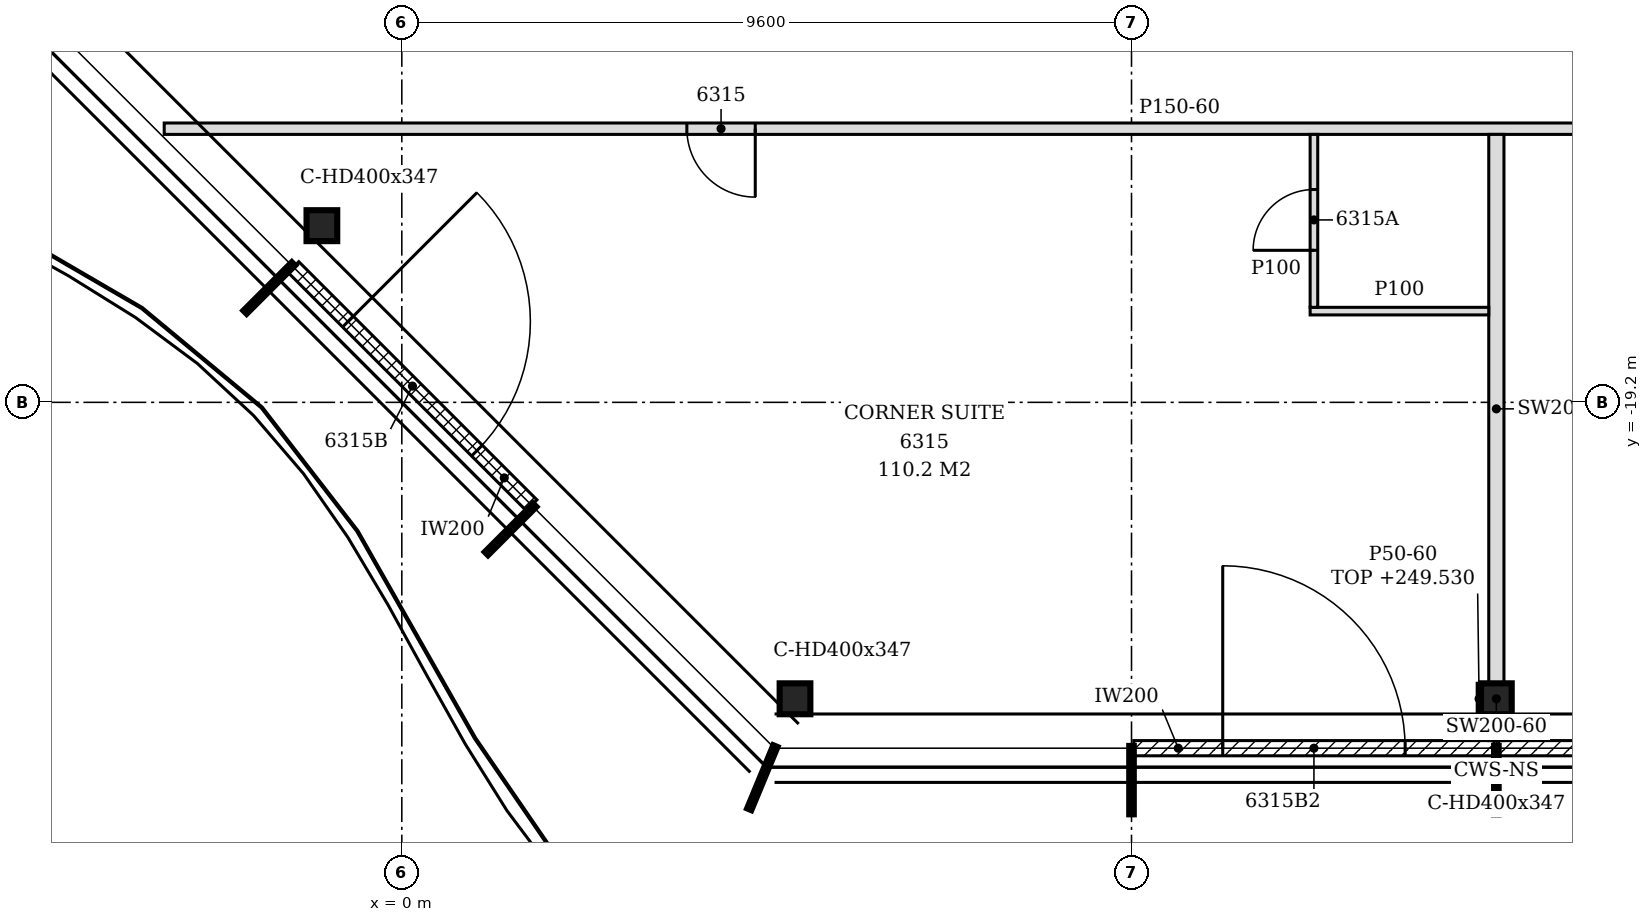
"""IFC4 building model, lengths in metres.
Left out: names, types, materials, properties, quantities, classifications, styles, units other than length and angle.
Written with IfcOpenShell. Run it as: python <this file> out.ifc"""

import sys

from ifc_helpers import new_model, si_unit, direction, frame, frame_2d, origin, origin_2d, place, context, subcontext, project, spatial, polyline, rectangle, i_section, outline, extrude, element, fill, save


model = new_model("IFC4")
c1 = context("Model", 3, precision=1e-05, world=origin(), true_north=direction((0.0, 1.0)))
c2 = subcontext(c1, "Body", "Model", "MODEL_VIEW")
j1 = project(units=[si_unit("LENGTHUNIT", "METRE"), si_unit("PLANEANGLEUNIT", "RADIAN")], contexts=[c1])
p1 = place(None, origin())
s1 = spatial("IfcSite", under=j1, at=p1, CompositionType="ELEMENT")
p2 = place(p1, origin())
s2 = spatial("IfcBuilding", under=s1, at=p2, CompositionType="ELEMENT")
p3 = place(p2, frame((0.0, 0.0, 246.6)))
s3 = spatial("IfcBuildingStorey", under=s2, at=p3, CompositionType="ELEMENT", Elevation=246.6)
for number, where, z_axis, x_axis in (
    (1, (5.173, -23.1, -0.15), (0.0, 0.0, 1.0), (1.0, 0.0, 0.0)),
    (2, (14.4, -23.1, -0.15), (0.0, 0.0, 1.0), (1.0, 0.0, 0.0)),
    (3, (-1.052, -16.876, -0.15), (0.0, 0.0, 1.0), (1.0, 0.0, 0.0)),
):
    element("IfcColumn", number, at=place(p3, frame(where, z_axis=z_axis, x_axis=x_axis)), inside=s3, PredefinedType="COLUMN", context=c2, shape_type="SweptSolid", body=[
        extrude(i_section(OverallWidth=0.404, OverallDepth=0.407, WebThickness=0.027, FlangeThickness=0.044, FilletRadius=0.015, at=origin_2d()), origin(), (0.0, 0.0, 1.0), 3.6),
    ])
p4 = place(p3, frame((9.63, -23.75, 0.0), z_axis=(0.0, 0.0, 1.0), x_axis=(1.0, 0.0, 0.0)))
e4 = element("IfcWall", 4, at=p4, inside=s3, PredefinedType="NOTDEFINED", context=c2, shape_type="SweptSolid", body=[
    extrude(rectangle(XDim=4.74, YDim=0.2, at=frame_2d((2.37, 0.0))), origin(), (0.0, 0.0, 1.0), 3.45),
])
p5 = place(p4, frame((1.17, 0.0, 0.0)))
e5 = element("IfcOpeningElement", 5, at=p5, cuts=e4, PredefinedType="OPENING", context=c2, shape_type="SweptSolid", body=[
    extrude(rectangle(XDim=2.4, YDim=2.4, at=frame_2d((1.2, 1.2))), frame((0.0, 0.11, 0.0), z_axis=(0.0, -1.0, 0.0), x_axis=(1.0, 0.0, 0.0)), (0.0, 0.0, 1.0), 0.22),
])
p6 = place(p3, frame((14.43, -23.75, 0.0), z_axis=(0.0, 0.0, 1.0), x_axis=(1.0, 0.0, 0.0)))
e6 = element("IfcWall", 6, at=p6, inside=s3, PredefinedType="NOTDEFINED", context=c2, shape_type="SweptSolid", body=[
    extrude(rectangle(XDim=4.74, YDim=0.2, at=frame_2d((2.37, 0.0))), origin(), (0.0, 0.0, 1.0), 3.45),
])
p7 = place(p6, frame((1.17, 0.0, 0.0)))
e7 = element("IfcOpeningElement", 7, at=p7, cuts=e6, PredefinedType="OPENING", context=c2, shape_type="SweptSolid", body=[
    extrude(rectangle(XDim=2.4, YDim=2.4, at=frame_2d((1.2, 1.2))), frame((0.0, 0.11, 0.0), z_axis=(0.0, -1.0, 0.0), x_axis=(1.0, 0.0, 0.0)), (0.0, 0.0, 1.0), 0.22),
])
p8 = place(p3, frame((-1.427, -17.42, 0.0), z_axis=(0.0, 0.0, 1.0), x_axis=(0.707106781187, -0.707106781187, 0.0)))
e8 = element("IfcWall", 8, at=p8, inside=s3, PredefinedType="NOTDEFINED", context=c2, shape_type="SweptSolid", body=[
    extrude(rectangle(XDim=4.431, YDim=0.2, at=frame_2d((2.216, 0.0))), origin(), (0.0, 0.0, 1.0), 3.45),
])
p9 = place(p8, frame((1.015, 0.0, 0.0)))
e9 = element("IfcOpeningElement", 9, at=p9, cuts=e8, PredefinedType="OPENING", context=c2, shape_type="SweptSolid", body=[
    extrude(rectangle(XDim=2.4, YDim=2.4, at=frame_2d((1.2, 1.2))), frame((0.0, 0.11, 0.0), z_axis=(0.0, -1.0, 0.0), x_axis=(1.0, 0.0, 0.0)), (0.0, 0.0, 1.0), 0.22),
])
p10 = place(p3, frame((14.4, -23.65, 0.0), z_axis=(0.0, 0.0, 1.0), x_axis=(0.0, 1.0, 0.0)))
e10 = element("IfcWall", 10, at=p10, inside=s3, PredefinedType="PARTITIONING", context=c2, shape_type="SweptSolid", body=[
    extrude(rectangle(XDim=0.346, YDim=0.2, at=frame_2d((0.173, 0.0))), origin(), (0.0, 0.0, 1.0), 3.45),
])
p11 = place(p3, frame((14.4, -22.896, 0.0), z_axis=(0.0, 0.0, 1.0), x_axis=(0.0, 1.0, 0.0)))
e11 = element("IfcWall", 11, at=p11, inside=s3, PredefinedType="PARTITIONING", context=c2, shape_type="SweptSolid", body=[
    extrude(outline(polyline([(0.0, 0.0), (7.221, 0.0), (7.221, 3.45), (3.802, 3.45), (3.8, 2.88), (3.592, 2.88), (3.59, 3.45), (0.0, 3.45), (0.0, 0.0)])), frame((0.0, 0.1, 0.0), z_axis=(0.0, -1.0, 0.0), x_axis=(1.0, 0.0, 0.0)), (0.0, 0.0, 1.0), 0.2),
])
p12 = place(p3, frame((11.95, -18.0, 0.0), z_axis=(0.0, 0.0, 1.0), x_axis=(1.0, 0.0, 0.0)))
e12 = element("IfcWall", 12, at=p12, inside=s3, PredefinedType="PARTITIONING", context=c2, shape_type="SweptSolid", body=[
    extrude(rectangle(XDim=2.35, YDim=0.1, at=frame_2d((1.175, 0.0))), origin(), (0.0, 0.0, 1.0), 3.45),
])
p13 = place(p3, frame((12.0, -17.95, 0.0), z_axis=(0.0, 0.0, 1.0), x_axis=(0.0, 1.0, 0.0)))
e13 = element("IfcWall", 13, at=p13, inside=s3, PredefinedType="PARTITIONING", context=c2, shape_type="SweptSolid", body=[
    extrude(rectangle(XDim=2.275, YDim=0.1, at=frame_2d((1.137, 0.0))), origin(), (0.0, 0.0, 1.0), 3.45),
])
p14 = place(p13, frame((0.75, 0.0, 0.0)))
e14 = element("IfcOpeningElement", 14, at=p14, cuts=e13, PredefinedType="OPENING", context=c2, shape_type="SweptSolid", body=[
    extrude(rectangle(XDim=0.8, YDim=2.1, at=frame_2d((0.4, 1.05))), frame((0.0, 0.06, 0.0), z_axis=(0.0, -1.0, 0.0), x_axis=(1.0, 0.0, 0.0)), (0.0, 0.0, 1.0), 0.12),
])
p15 = place(p3, frame((-3.126, -15.6, 0.0), z_axis=(0.0, 0.0, 1.0), x_axis=(1.0, 0.0, 0.0)))
e15 = element("IfcWall", 15, at=p15, inside=s3, PredefinedType="PARTITIONING", context=c2, shape_type="SweptSolid", body=[
    extrude(outline(polyline([(0.0, 0.0), (23.753, 0.0), (23.753, 3.45), (22.476, 3.45), (22.474, 2.73), (22.176, 2.73), (22.174, 3.45), (10.476, 3.45), (10.474, 2.73), (10.176, 2.73), (10.174, 3.45), (1.369, 3.45), (1.367, 2.63), (0.229, 2.63), (0.227, 3.45), (0.0, 3.45), (0.0, 0.0)])), frame((0.0, 0.075, 0.0), z_axis=(0.0, -1.0, 0.0), x_axis=(1.0, 0.0, 0.0)), (0.0, 0.0, 1.0), 0.15),
])
p16 = place(p15, frame((18.937, 0.0, 0.0)))
e16 = element("IfcOpeningElement", 16, at=p16, cuts=e15, PredefinedType="OPENING", context=c2, shape_type="SweptSolid", body=[
    extrude(rectangle(XDim=0.9, YDim=2.1, at=frame_2d((0.45, 1.05))), frame((0.0, 0.085, 0.0), z_axis=(0.0, -1.0, 0.0), x_axis=(1.0, 0.0, 0.0)), (0.0, 0.0, 1.0), 0.17),
])
p17 = place(p15, frame((6.876, 0.0, 0.0)))
e17 = element("IfcOpeningElement", 17, at=p17, cuts=e15, PredefinedType="OPENING", context=c2, shape_type="SweptSolid", body=[
    extrude(rectangle(XDim=0.9, YDim=2.1, at=frame_2d((0.45, 1.05))), frame((0.0, 0.085, 0.0), z_axis=(0.0, -1.0, 0.0), x_axis=(1.0, 0.0, 0.0)), (0.0, 0.0, 1.0), 0.17),
])
p18 = place(p3, frame((14.173, -23.303, 0.0), z_axis=(0.0, 0.0, 1.0), x_axis=(0.0, 1.0, 0.0)))
e18 = element("IfcWall", 18, at=p18, inside=s3, PredefinedType="PARTITIONING", context=c2, shape_type="SweptSolid", body=[
    extrude(rectangle(XDim=0.407, YDim=0.05, at=frame_2d((0.204, 0.0))), origin(), (0.0, 0.0, 1.0), 2.93),
])
p19 = place(p5, origin())
e19 = element("IfcDoor", 19, at=p19, inside=s3, OperationType="SINGLE_SWING_LEFT", PredefinedType="DOOR", context=c2, shape_type="SweptSolid", body=[
    extrude(rectangle(XDim=2.4, YDim=2.4, at=frame_2d((1.2, 1.2))), frame((0.0, 0.025, 0.0), z_axis=(0.0, -1.0, 0.0), x_axis=(1.0, 0.0, 0.0)), (0.0, 0.0, 1.0), 0.05),
])
fill(e5, e19)
p20 = place(p9, origin())
e20 = element("IfcDoor", 20, at=p20, inside=s3, OperationType="SINGLE_SWING_LEFT", PredefinedType="DOOR", context=c2, shape_type="SweptSolid", body=[
    extrude(rectangle(XDim=2.4, YDim=2.4, at=frame_2d((1.2, 1.2))), frame((0.0, 0.025, 0.0), z_axis=(0.0, -1.0, 0.0), x_axis=(1.0, 0.0, 0.0)), (0.0, 0.0, 1.0), 0.05),
])
fill(e9, e20)
p21 = place(p17, frame((0.9, 0.0, 0.0), z_axis=(0.0, 0.0, 1.0), x_axis=(-1.0, 0.0, 0.0)))
e21 = element("IfcDoor", 21, at=p21, inside=s3, OperationType="SINGLE_SWING_LEFT", PredefinedType="DOOR", context=c2, shape_type="SweptSolid", body=[
    extrude(rectangle(XDim=0.9, YDim=2.1, at=frame_2d((0.45, 1.05))), frame((0.0, 0.025, 0.0), z_axis=(0.0, -1.0, 0.0), x_axis=(1.0, 0.0, 0.0)), (0.0, 0.0, 1.0), 0.05),
])
fill(e17, e21)
p22 = place(p14, origin())
e22 = element("IfcDoor", 22, at=p22, inside=s3, OperationType="SINGLE_SWING_LEFT", PredefinedType="DOOR", context=c2, shape_type="SweptSolid", body=[
    extrude(rectangle(XDim=0.8, YDim=2.1, at=frame_2d((0.4, 1.05))), frame((0.0, 0.025, 0.0), z_axis=(0.0, -1.0, 0.0), x_axis=(1.0, 0.0, 0.0)), (0.0, 0.0, 1.0), 0.05),
])
fill(e14, e22)
save(model, sys.argv[1])
